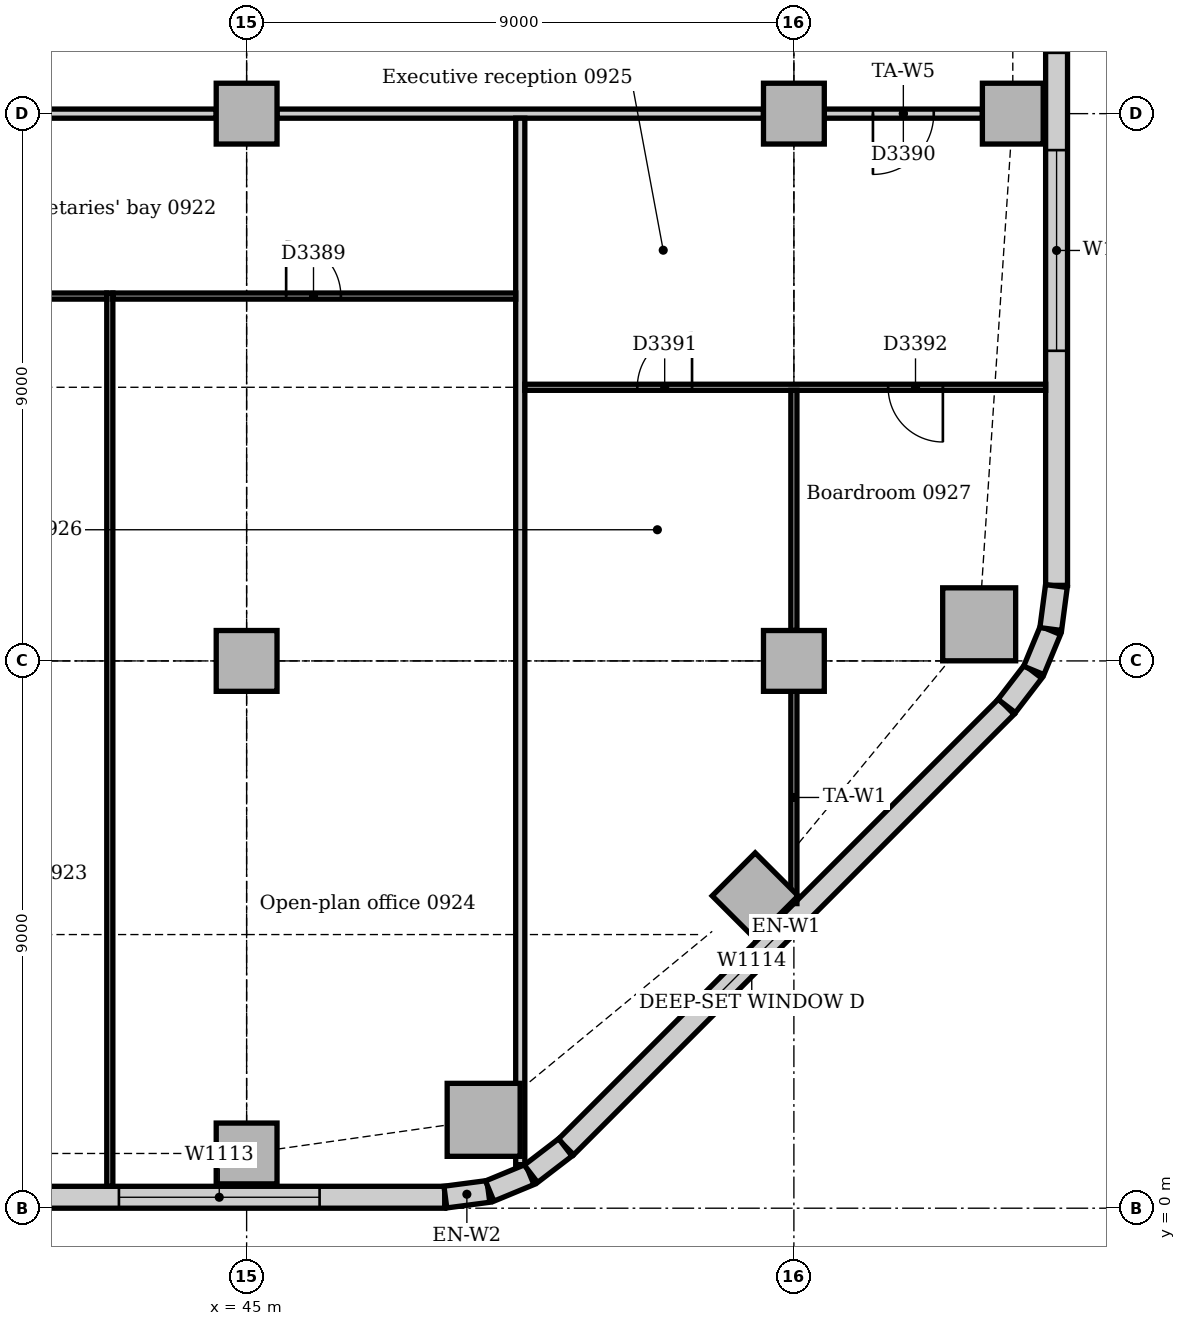
"""IFC4 building model, lengths in metres.
Left out: names, types, materials, properties, quantities, classifications, styles, units other than length and angle.
Written with IfcOpenShell. Run it as: python <this file> out.ifc"""

import sys

from ifc_helpers import new_model, si_unit, direction, frame, frame_2d, origin, origin_2d, place, context, subcontext, project, spatial, rectangle, extrude, element, fill, save


model = new_model("IFC4")
c1 = context("Model", 3, precision=1e-05, world=origin(), true_north=direction((0.0, 1.0)))
c2 = subcontext(c1, "Body", "Model", "MODEL_VIEW")
j1 = project(units=[si_unit("LENGTHUNIT", "METRE"), si_unit("PLANEANGLEUNIT", "RADIAN")], contexts=[c1])
p1 = place(None, origin())
s1 = spatial("IfcSite", under=j1, at=p1, CompositionType="ELEMENT")
p2 = place(p1, origin())
s2 = spatial("IfcBuilding", under=s1, at=p2, CompositionType="ELEMENT")
p3 = place(p2, frame((0.0, 0.0, 42.0)))
s3 = spatial("IfcBuildingStorey", under=s2, at=p3, CompositionType="ELEMENT", Elevation=42.0)
for number, where, z_axis, x_axis in (
    (1, (48.898, 1.453, 0.0), (0.0, 0.0, 1.0), (1.0, 0.0, 0.0)),
    (2, (57.047, 9.602, 0.0), (0.0, 0.0, 1.0), (1.0, 0.0, 0.0)),
):
    element("IfcColumn", number, at=place(p3, frame(where, z_axis=z_axis, x_axis=x_axis)), inside=s3, PredefinedType="COLUMN", context=c2, shape_type="SweptSolid", body=[
        extrude(rectangle(XDim=1.2, YDim=1.2, at=origin_2d()), origin(), (0.0, 0.0, 1.0), 3.7),
    ])
for number, where, z_axis, x_axis in (
    (3, (45.0, 0.9, 0.0), (0.0, 0.0, 1.0), (1.0, 0.0, 0.0)),
    (4, (53.364, 5.136, 0.0), (0.0, 0.0, 1.0), (0.707, 0.707, 0.0)),
    (5, (57.6, 18.0, 0.0), (0.0, 0.0, 1.0), (1.0, 0.0, 0.0)),
    (6, (45.0, 9.0, 0.0), (0.0, 0.0, 1.0), (1.0, 0.0, 0.0)),
    (7, (45.0, 18.0, 0.0), (0.0, 0.0, 1.0), (1.0, 0.0, 0.0)),
    (8, (54.0, 9.0, 0.0), (0.0, 0.0, 1.0), (1.0, 0.0, 0.0)),
    (9, (54.0, 18.0, 0.0), (0.0, 0.0, 1.0), (1.0, 0.0, 0.0)),
):
    element("IfcColumn", number, at=place(p3, frame(where, z_axis=z_axis, x_axis=x_axis)), inside=s3, PredefinedType="COLUMN", context=c2, shape_type="SweptSolid", body=[
        extrude(rectangle(XDim=1.0, YDim=1.0, at=origin_2d()), origin(), (0.0, 0.0, 1.0), 3.7),
    ])
p4 = place(p3, frame((4.243, 0.18, 0.0), z_axis=(0.0, 0.0, 1.0), x_axis=(1.0, 0.0, 0.0)))
e10 = element("IfcWall", 10, at=p4, inside=s3, PredefinedType="STANDARD", context=c2, shape_type="SweptSolid", body=[
    extrude(rectangle(XDim=44.015, YDim=0.36, at=frame_2d((22.007, 0.0))), origin(), (0.0, 0.0, 1.0), 3.7),
])
p5 = place(p4, frame((2.357, 0.0, 0.9)))
e11 = element("IfcOpeningElement", 11, at=p5, cuts=e10, PredefinedType="OPENING", context=c2, shape_type="SweptSolid", body=[
    extrude(rectangle(XDim=3.3, YDim=1.6, at=frame_2d((1.65, 0.8))), frame((0.0, 0.19, 0.0), z_axis=(0.0, -1.0, 0.0), x_axis=(1.0, 0.0, 0.0)), (0.0, 0.0, 1.0), 0.38),
])
p6 = place(p4, frame((6.857, 0.0, 0.9)))
e12 = element("IfcOpeningElement", 12, at=p6, cuts=e10, PredefinedType="OPENING", context=c2, shape_type="SweptSolid", body=[
    extrude(rectangle(XDim=3.3, YDim=1.6, at=frame_2d((1.65, 0.8))), frame((0.0, 0.19, 0.0), z_axis=(0.0, -1.0, 0.0), x_axis=(1.0, 0.0, 0.0)), (0.0, 0.0, 1.0), 0.38),
])
p7 = place(p4, frame((11.357, 0.0, 0.9)))
e13 = element("IfcOpeningElement", 13, at=p7, cuts=e10, PredefinedType="OPENING", context=c2, shape_type="SweptSolid", body=[
    extrude(rectangle(XDim=3.3, YDim=1.6, at=frame_2d((1.65, 0.8))), frame((0.0, 0.19, 0.0), z_axis=(0.0, -1.0, 0.0), x_axis=(1.0, 0.0, 0.0)), (0.0, 0.0, 1.0), 0.38),
])
p8 = place(p4, frame((15.857, 0.0, 0.9)))
e14 = element("IfcOpeningElement", 14, at=p8, cuts=e10, PredefinedType="OPENING", context=c2, shape_type="SweptSolid", body=[
    extrude(rectangle(XDim=3.3, YDim=1.6, at=frame_2d((1.65, 0.8))), frame((0.0, 0.19, 0.0), z_axis=(0.0, -1.0, 0.0), x_axis=(1.0, 0.0, 0.0)), (0.0, 0.0, 1.0), 0.38),
])
p9 = place(p4, frame((20.357, 0.0, 0.9)))
e15 = element("IfcOpeningElement", 15, at=p9, cuts=e10, PredefinedType="OPENING", context=c2, shape_type="SweptSolid", body=[
    extrude(rectangle(XDim=3.3, YDim=1.6, at=frame_2d((1.65, 0.8))), frame((0.0, 0.19, 0.0), z_axis=(0.0, -1.0, 0.0), x_axis=(1.0, 0.0, 0.0)), (0.0, 0.0, 1.0), 0.38),
])
p10 = place(p4, frame((24.857, 0.0, 0.9)))
e16 = element("IfcOpeningElement", 16, at=p10, cuts=e10, PredefinedType="OPENING", context=c2, shape_type="SweptSolid", body=[
    extrude(rectangle(XDim=3.3, YDim=1.6, at=frame_2d((1.65, 0.8))), frame((0.0, 0.19, 0.0), z_axis=(0.0, -1.0, 0.0), x_axis=(1.0, 0.0, 0.0)), (0.0, 0.0, 1.0), 0.38),
])
p11 = place(p4, frame((29.357, 0.0, 0.9)))
e17 = element("IfcOpeningElement", 17, at=p11, cuts=e10, PredefinedType="OPENING", context=c2, shape_type="SweptSolid", body=[
    extrude(rectangle(XDim=3.3, YDim=1.6, at=frame_2d((1.65, 0.8))), frame((0.0, 0.19, 0.0), z_axis=(0.0, -1.0, 0.0), x_axis=(1.0, 0.0, 0.0)), (0.0, 0.0, 1.0), 0.38),
])
p12 = place(p4, frame((33.857, 0.0, 0.9)))
e18 = element("IfcOpeningElement", 18, at=p12, cuts=e10, PredefinedType="OPENING", context=c2, shape_type="SweptSolid", body=[
    extrude(rectangle(XDim=3.3, YDim=1.6, at=frame_2d((1.65, 0.8))), frame((0.0, 0.19, 0.0), z_axis=(0.0, -1.0, 0.0), x_axis=(1.0, 0.0, 0.0)), (0.0, 0.0, 1.0), 0.38),
])
p13 = place(p4, frame((38.657, 0.0, 0.9)))
e19 = element("IfcOpeningElement", 19, at=p13, cuts=e10, PredefinedType="OPENING", context=c2, shape_type="SweptSolid", body=[
    extrude(rectangle(XDim=3.3, YDim=1.6, at=frame_2d((1.65, 0.8))), frame((0.0, 0.19, 0.0), z_axis=(0.0, -1.0, 0.0), x_axis=(1.0, 0.0, 0.0)), (0.0, 0.0, 1.0), 0.38),
])
p14 = place(p3, frame((50.251, 1.006, 0.0), z_axis=(0.0, 0.0, 1.0), x_axis=(0.707106781187, 0.707106781187, 0.0)))
e20 = element("IfcWall", 20, at=p14, inside=s3, PredefinedType="STANDARD", context=c2, shape_type="SweptSolid", body=[
    extrude(rectangle(XDim=10.243, YDim=0.36, at=frame_2d((5.121, 0.0))), origin(), (0.0, 0.0, 1.0), 3.7),
])
p15 = place(p14, frame((3.421, 0.0, 0.9)))
e21 = element("IfcOpeningElement", 21, at=p15, cuts=e20, PredefinedType="OPENING", context=c2, shape_type="SweptSolid", body=[
    extrude(rectangle(XDim=1.8, YDim=1.6, at=frame_2d((0.9, 0.8))), frame((0.0, 0.19, 0.0), z_axis=(0.0, -1.0, 0.0), x_axis=(1.0, 0.0, 0.0)), (0.0, 0.0, 1.0), 0.38),
])
p16 = place(p3, frame((58.32, 10.243, 0.0), z_axis=(0.0, 0.0, 1.0), x_axis=(0.0, 1.0, 0.0)))
e22 = element("IfcWall", 22, at=p16, inside=s3, PredefinedType="STANDARD", context=c2, shape_type="SweptSolid", body=[
    extrude(rectangle(XDim=24.515, YDim=0.36, at=frame_2d((12.257, 0.0))), origin(), (0.0, 0.0, 1.0), 3.7),
])
p17 = place(p16, frame((3.857, 0.0, 0.9)))
e23 = element("IfcOpeningElement", 23, at=p17, cuts=e22, PredefinedType="OPENING", context=c2, shape_type="SweptSolid", body=[
    extrude(rectangle(XDim=3.3, YDim=1.6, at=frame_2d((1.65, 0.8))), frame((0.0, 0.19, 0.0), z_axis=(0.0, -1.0, 0.0), x_axis=(1.0, 0.0, 0.0)), (0.0, 0.0, 1.0), 0.38),
])
p18 = place(p16, frame((8.757, 0.0, 0.9)))
e24 = element("IfcOpeningElement", 24, at=p18, cuts=e22, PredefinedType="OPENING", context=c2, shape_type="SweptSolid", body=[
    extrude(rectangle(XDim=1.8, YDim=1.6, at=frame_2d((0.9, 0.8))), frame((0.0, 0.19, 0.0), z_axis=(0.0, -1.0, 0.0), x_axis=(1.0, 0.0, 0.0)), (0.0, 0.0, 1.0), 0.38),
])
p19 = place(p16, frame((12.857, 0.0, 0.9)))
e25 = element("IfcOpeningElement", 25, at=p19, cuts=e22, PredefinedType="OPENING", context=c2, shape_type="SweptSolid", body=[
    extrude(rectangle(XDim=3.3, YDim=1.6, at=frame_2d((1.65, 0.8))), frame((0.0, 0.19, 0.0), z_axis=(0.0, -1.0, 0.0), x_axis=(1.0, 0.0, 0.0)), (0.0, 0.0, 1.0), 0.38),
])
p20 = place(p16, frame((17.357, 0.0, 0.9)))
e26 = element("IfcOpeningElement", 26, at=p20, cuts=e22, PredefinedType="OPENING", context=c2, shape_type="SweptSolid", body=[
    extrude(rectangle(XDim=3.3, YDim=1.6, at=frame_2d((1.65, 0.8))), frame((0.0, 0.19, 0.0), z_axis=(0.0, -1.0, 0.0), x_axis=(1.0, 0.0, 0.0)), (0.0, 0.0, 1.0), 0.38),
])
for number, where, z_axis, x_axis in (
    (27, (48.269, 0.183, 0.0), (0.0, 0.0, 1.0), (0.991, 0.131, 0.0)),
    (28, (48.997, 0.282, 0.0), (0.0, 0.0, 1.0), (0.924, 0.383, 0.0)),
):
    element("IfcWall", number, at=place(p3, frame(where, z_axis=z_axis, x_axis=x_axis)), inside=s3, PredefinedType="STANDARD", context=c2, shape_type="SweptSolid", body=[
        extrude(rectangle(XDim=0.713, YDim=0.36, at=frame_2d((0.356, 0.0))), origin(), (0.0, 0.0, 1.0), 3.7),
    ])
for number, where, z_axis, x_axis in (
    (29, (49.675, 0.566, 0.0), (0.0, 0.0, 1.0), (0.793, 0.609, 0.0)),
    (30, (57.5, 8.259, 0.0), (0.0, 0.0, 1.0), (0.609, 0.793, 0.0)),
):
    element("IfcWall", number, at=place(p3, frame(where, z_axis=z_axis, x_axis=x_axis)), inside=s3, PredefinedType="STANDARD", context=c2, shape_type="SweptSolid", body=[
        extrude(rectangle(XDim=0.713, YDim=0.36, at=frame_2d((0.357, 0.0))), origin(), (0.0, 0.0, 1.0), 3.7),
    ])
for number, where, z_axis, x_axis in (
    (31, (57.945, 8.844, 0.0), (0.0, 0.0, 1.0), (0.383, 0.924, 0.0)),
    (32, (58.224, 9.524, 0.0), (0.0, 0.0, 1.0), (0.131, 0.991, 0.0)),
):
    element("IfcWall", number, at=place(p3, frame(where, z_axis=z_axis, x_axis=x_axis)), inside=s3, PredefinedType="STANDARD", context=c2, shape_type="SweptSolid", body=[
        extrude(rectangle(XDim=0.713, YDim=0.36, at=frame_2d((0.356, 0.0))), origin(), (0.0, 0.0, 1.0), 3.7),
    ])
p21 = place(p3, frame((54.5, 18.0, 0.0), z_axis=(0.0, 0.0, 1.0), x_axis=(1.0, 0.0, 0.0)))
e33 = element("IfcWall", 33, at=p21, inside=s3, PredefinedType="PARTITIONING", context=c2, shape_type="SweptSolid", body=[
    extrude(rectangle(XDim=2.6, YDim=0.15, at=frame_2d((1.3, 0.0))), origin(), (0.0, 0.0, 1.0), 3.452),
])
p22 = place(p21, frame((0.8, 0.0, 0.0)))
e34 = element("IfcOpeningElement", 34, at=p22, cuts=e33, PredefinedType="OPENING", context=c2, shape_type="SweptSolid", body=[
    extrude(rectangle(XDim=1.0, YDim=2.1, at=frame_2d((0.5, 1.05))), frame((0.0, 0.085, 0.0), z_axis=(0.0, -1.0, 0.0), x_axis=(1.0, 0.0, 0.0)), (0.0, 0.0, 1.0), 0.17),
])
p23 = place(p3, frame((45.5, 18.0, 0.0), z_axis=(0.0, 0.0, 1.0), x_axis=(1.0, 0.0, 0.0)))
e35 = element("IfcWall", 35, at=p23, inside=s3, PredefinedType="PARTITIONING", context=c2, shape_type="SweptSolid", body=[
    extrude(rectangle(XDim=8.0, YDim=0.15, at=frame_2d((4.0, 0.0))), origin(), (0.0, 0.0, 1.0), 3.0),
])
p24 = place(p3, frame((36.5, 18.0, 0.0), z_axis=(0.0, 0.0, 1.0), x_axis=(1.0, 0.0, 0.0)))
e36 = element("IfcWall", 36, at=p24, inside=s3, PredefinedType="PARTITIONING", context=c2, shape_type="SweptSolid", body=[
    extrude(rectangle(XDim=8.0, YDim=0.15, at=frame_2d((4.0, 0.0))), origin(), (0.0, 0.0, 1.0), 3.0),
])
p25 = place(p24, frame((3.5, 0.0, 0.0)))
e37 = element("IfcOpeningElement", 37, at=p25, cuts=e36, PredefinedType="OPENING", context=c2, shape_type="SweptSolid", body=[
    extrude(rectangle(XDim=1.0, YDim=2.1, at=frame_2d((0.5, 1.05))), frame((0.0, 0.085, 0.0), z_axis=(0.0, -1.0, 0.0), x_axis=(1.0, 0.0, 0.0)), (0.0, 0.0, 1.0), 0.17),
])
p26 = place(p3, frame((49.5, 0.716, 0.0), z_axis=(0.0, 0.0, 1.0), x_axis=(0.0, 1.0, 0.0)))
e38 = element("IfcWall", 38, at=p26, inside=s3, PredefinedType="PARTITIONING", context=c2, shape_type="SweptSolid", body=[
    extrude(rectangle(XDim=17.209, YDim=0.15, at=frame_2d((8.604, 0.0))), origin(), (0.0, 0.0, 1.0), 3.7),
])
p27 = place(p3, frame((42.75, 0.36, 0.0), z_axis=(0.0, 0.0, 1.0), x_axis=(0.0, 1.0, 0.0)))
e39 = element("IfcWall", 39, at=p27, inside=s3, PredefinedType="PARTITIONING", context=c2, shape_type="SweptSolid", body=[
    extrude(rectangle(XDim=14.69, YDim=0.1, at=frame_2d((7.345, 0.0))), origin(), (0.0, 0.0, 1.0), 3.7),
])
p28 = place(p3, frame((36.075, 15.0, 0.0), z_axis=(0.0, 0.0, 1.0), x_axis=(1.0, 0.0, 0.0)))
e40 = element("IfcWall", 40, at=p28, inside=s3, PredefinedType="PARTITIONING", context=c2, shape_type="SweptSolid", body=[
    extrude(rectangle(XDim=6.625, YDim=0.1, at=frame_2d((3.312, 0.0))), origin(), (0.0, 0.0, 1.0), 3.7),
])
p29 = place(p28, frame((2.85, 0.0, 0.0)))
e41 = element("IfcOpeningElement", 41, at=p29, cuts=e40, PredefinedType="OPENING", context=c2, shape_type="SweptSolid", body=[
    extrude(rectangle(XDim=0.9, YDim=2.1, at=frame_2d((0.45, 1.05))), frame((0.0, 0.06, 0.0), z_axis=(0.0, -1.0, 0.0), x_axis=(1.0, 0.0, 0.0)), (0.0, 0.0, 1.0), 0.12),
])
p30 = place(p3, frame((42.8, 15.0, 0.0), z_axis=(0.0, 0.0, 1.0), x_axis=(1.0, 0.0, 0.0)))
e42 = element("IfcWall", 42, at=p30, inside=s3, PredefinedType="PARTITIONING", context=c2, shape_type="SweptSolid", body=[
    extrude(rectangle(XDim=6.625, YDim=0.1, at=frame_2d((3.312, 0.0))), origin(), (0.0, 0.0, 1.0), 3.7),
])
p31 = place(p30, frame((2.85, 0.0, 0.0)))
e43 = element("IfcOpeningElement", 43, at=p31, cuts=e42, PredefinedType="OPENING", context=c2, shape_type="SweptSolid", body=[
    extrude(rectangle(XDim=0.9, YDim=2.1, at=frame_2d((0.45, 1.05))), frame((0.0, 0.06, 0.0), z_axis=(0.0, -1.0, 0.0), x_axis=(1.0, 0.0, 0.0)), (0.0, 0.0, 1.0), 0.12),
])
p32 = place(p3, frame((49.575, 13.5, 0.0), z_axis=(0.0, 0.0, 1.0), x_axis=(1.0, 0.0, 0.0)))
e44 = element("IfcWall", 44, at=p32, inside=s3, PredefinedType="PARTITIONING", context=c2, shape_type="SweptSolid", body=[
    extrude(rectangle(XDim=8.565, YDim=0.1, at=frame_2d((4.282, 0.0))), origin(), (0.0, 0.0, 1.0), 3.2),
])
p33 = place(p32, frame((1.85, 0.0, 0.0)))
e45 = element("IfcOpeningElement", 45, at=p33, cuts=e44, PredefinedType="OPENING", context=c2, shape_type="SweptSolid", body=[
    extrude(rectangle(XDim=0.9, YDim=2.1, at=frame_2d((0.45, 1.05))), frame((0.0, 0.06, 0.0), z_axis=(0.0, -1.0, 0.0), x_axis=(1.0, 0.0, 0.0)), (0.0, 0.0, 1.0), 0.12),
])
p34 = place(p32, frame((5.975, 0.0, 0.0)))
e46 = element("IfcOpeningElement", 46, at=p34, cuts=e44, PredefinedType="OPENING", context=c2, shape_type="SweptSolid", body=[
    extrude(rectangle(XDim=0.9, YDim=2.1, at=frame_2d((0.45, 1.05))), frame((0.0, 0.06, 0.0), z_axis=(0.0, -1.0, 0.0), x_axis=(1.0, 0.0, 0.0)), (0.0, 0.0, 1.0), 0.12),
])
p35 = place(p3, frame((54.0, 5.009, 0.0), z_axis=(0.0, 0.0, 1.0), x_axis=(0.0, 1.0, 0.0)))
e47 = element("IfcWall", 47, at=p35, inside=s3, PredefinedType="PARTITIONING", context=c2, shape_type="SweptSolid", body=[
    extrude(rectangle(XDim=3.491, YDim=0.1, at=frame_2d((1.745, 0.0))), origin(), (0.0, 0.0, 1.0), 3.502),
])
p36 = place(p3, frame((54.0, 9.5, 0.0), z_axis=(0.0, 0.0, 1.0), x_axis=(0.0, 1.0, 0.0)))
e48 = element("IfcWall", 48, at=p36, inside=s3, PredefinedType="PARTITIONING", context=c2, shape_type="SweptSolid", body=[
    extrude(rectangle(XDim=3.95, YDim=0.1, at=frame_2d((1.975, 0.0))), origin(), (0.0, 0.0, 1.0), 3.008),
])
p37 = place(p13, origin())
e49 = element("IfcWindow", 49, at=p37, inside=s3, PartitioningType="SINGLE_PANEL", PredefinedType="WINDOW", context=c2, shape_type="SweptSolid", body=[
    extrude(rectangle(XDim=3.3, YDim=1.6, at=frame_2d((1.65, 0.8))), frame((0.0, 0.13, 0.0), z_axis=(0.0, -1.0, 0.0), x_axis=(1.0, 0.0, 0.0)), (0.0, 0.0, 1.0), 0.06),
])
fill(e19, e49)
p38 = place(p15, origin())
e50 = element("IfcWindow", 50, at=p38, inside=s3, PartitioningType="SINGLE_PANEL", PredefinedType="WINDOW", context=c2, shape_type="SweptSolid", body=[
    extrude(rectangle(XDim=1.8, YDim=1.6, at=frame_2d((0.9, 0.8))), frame((0.0, 0.13, 0.0), z_axis=(0.0, -1.0, 0.0), x_axis=(1.0, 0.0, 0.0)), (0.0, 0.0, 1.0), 0.06),
])
fill(e21, e50)
p39 = place(p17, origin())
e51 = element("IfcWindow", 51, at=p39, inside=s3, PartitioningType="SINGLE_PANEL", PredefinedType="WINDOW", context=c2, shape_type="SweptSolid", body=[
    extrude(rectangle(XDim=3.3, YDim=1.6, at=frame_2d((1.65, 0.8))), frame((0.0, 0.13, 0.0), z_axis=(0.0, -1.0, 0.0), x_axis=(1.0, 0.0, 0.0)), (0.0, 0.0, 1.0), 0.06),
])
fill(e23, e51)
p40 = place(p31, origin())
e52 = element("IfcDoor", 52, at=p40, inside=s3, OperationType="SINGLE_SWING_LEFT", PredefinedType="DOOR", context=c2, shape_type="SweptSolid", body=[
    extrude(rectangle(XDim=0.9, YDim=2.1, at=frame_2d((0.45, 1.05))), frame((0.0, 0.025, 0.0), z_axis=(0.0, -1.0, 0.0), x_axis=(1.0, 0.0, 0.0)), (0.0, 0.0, 1.0), 0.05),
])
fill(e43, e52)
p41 = place(p22, frame((1.0, 0.0, 0.0), z_axis=(0.0, 0.0, 1.0), x_axis=(-1.0, 0.0, 0.0)))
e53 = element("IfcDoor", 53, at=p41, inside=s3, OperationType="SINGLE_SWING_RIGHT", PredefinedType="DOOR", context=c2, shape_type="SweptSolid", body=[
    extrude(rectangle(XDim=1.0, YDim=2.1, at=frame_2d((0.5, 1.05))), frame((0.0, 0.025, 0.0), z_axis=(0.0, -1.0, 0.0), x_axis=(1.0, 0.0, 0.0)), (0.0, 0.0, 1.0), 0.05),
])
fill(e34, e53)
p42 = place(p33, origin())
e54 = element("IfcDoor", 54, at=p42, inside=s3, OperationType="SINGLE_SWING_RIGHT", PredefinedType="DOOR", context=c2, shape_type="SweptSolid", body=[
    extrude(rectangle(XDim=0.9, YDim=2.1, at=frame_2d((0.45, 1.05))), frame((0.0, 0.025, 0.0), z_axis=(0.0, -1.0, 0.0), x_axis=(1.0, 0.0, 0.0)), (0.0, 0.0, 1.0), 0.05),
])
fill(e45, e54)
p43 = place(p34, frame((0.9, 0.0, 0.0), z_axis=(0.0, 0.0, 1.0), x_axis=(-1.0, 0.0, 0.0)))
e55 = element("IfcDoor", 55, at=p43, inside=s3, OperationType="SINGLE_SWING_LEFT", PredefinedType="DOOR", context=c2, shape_type="SweptSolid", body=[
    extrude(rectangle(XDim=0.9, YDim=2.1, at=frame_2d((0.45, 1.05))), frame((0.0, 0.025, 0.0), z_axis=(0.0, -1.0, 0.0), x_axis=(1.0, 0.0, 0.0)), (0.0, 0.0, 1.0), 0.05),
])
fill(e46, e55)
save(model, sys.argv[1])
